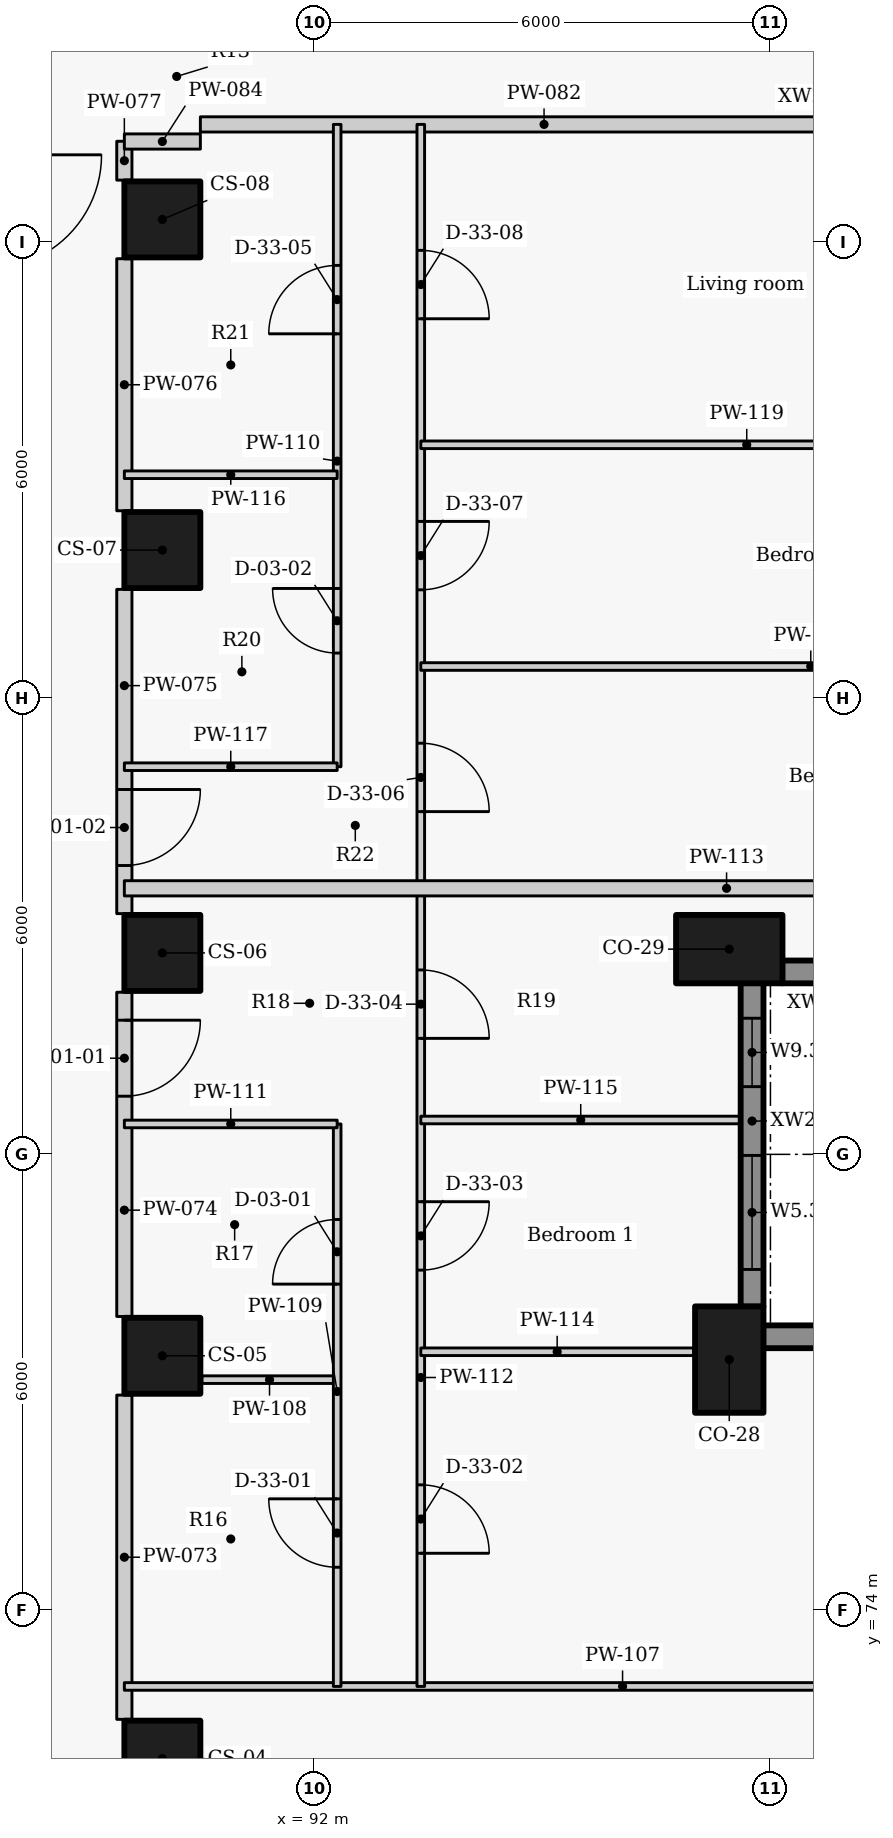
"""IFC4 building model, lengths in metres.
Left out: names, types, materials, properties, quantities, classifications, styles, units other than length and angle.
Written with IfcOpenShell. Run it as: python <this file> out.ifc"""

import sys

from ifc_helpers import new_model, si_unit, direction, frame, frame_2d, origin, origin_2d, place, context, subcontext, project, spatial, rectangle, extrude, element, fill, save


model = new_model("IFC4")
c1 = context("Model", 3, precision=1e-05, world=origin(), true_north=direction((0.0, 1.0)))
c2 = subcontext(c1, "Body", "Model", "MODEL_VIEW")
j1 = project(units=[si_unit("LENGTHUNIT", "METRE"), si_unit("PLANEANGLEUNIT", "RADIAN")], contexts=[c1])
p1 = place(None, origin())
s1 = spatial("IfcSite", under=j1, at=p1, CompositionType="ELEMENT")
p2 = place(p1, origin())
s2 = spatial("IfcBuilding", under=s1, at=p2, CompositionType="ELEMENT")
p3 = place(p2, frame((0.0, 0.0, 81.0)))
s3 = spatial("IfcBuildingStorey", under=s2, at=p3, CompositionType="ELEMENT", Elevation=81.0)
for number, where, z_axis, x_axis in (
    (1, (97.458, 77.3, 0.0), (0.0, 0.0, 1.0), (0.0, 1.0, 0.0)),
    (2, (97.458, 82.7, 0.0), (0.0, 0.0, 1.0), (1.0, 0.0, 0.0)),
):
    element("IfcColumn", number, at=place(p3, frame(where, z_axis=z_axis, x_axis=x_axis)), inside=s3, PredefinedType="COLUMN", context=c2, shape_type="SweptSolid", body=[
        extrude(rectangle(XDim=1.4, YDim=0.9, at=origin_2d()), origin(), (0.0, 0.0, 1.0), 3.3),
    ])
for number, where, z_axis, x_axis in (
    (3, (90.0, 72.05, 0.0), (0.0, 0.0, 1.0), (0.0, 1.0, 0.0)),
    (4, (90.0, 77.35, 0.0), (0.0, 0.0, 1.0), (0.0, 1.0, 0.0)),
    (5, (90.0, 82.65, 0.0), (0.0, 0.0, 1.0), (0.0, 1.0, 0.0)),
    (6, (90.0, 87.95, 0.0), (0.0, 0.0, 1.0), (0.0, 1.0, 0.0)),
    (7, (90.0, 92.3, 0.0), (0.0, 0.0, 1.0), (0.0, 1.0, 0.0)),
):
    element("IfcColumn", number, at=place(p3, frame(where, z_axis=z_axis, x_axis=x_axis)), inside=s3, PredefinedType="COLUMN", context=c2, shape_type="SweptSolid", body=[
        extrude(rectangle(XDim=1.0, YDim=1.0, at=origin_2d()), origin(), (0.0, 0.0, 1.0), 3.3),
    ])
p4 = place(p3, frame((98.154, 82.4, 0.0), z_axis=(0.0, 0.0, 1.0), x_axis=(1.0, 0.0, 0.0)))
e8 = element("IfcWall", 8, at=p4, inside=s3, PredefinedType="SOLIDWALL", context=c2, shape_type="SweptSolid", body=[
    extrude(rectangle(XDim=3.973, YDim=0.3, at=frame_2d((1.986, 0.0))), origin(), (0.0, 0.0, 1.0), 2.425),
])
p5 = place(p4, frame((1.236, 0.0, 0.9)))
e9 = element("IfcOpeningElement", 9, at=p5, cuts=e8, PredefinedType="OPENING", context=c2, shape_type="SweptSolid", body=[
    extrude(rectangle(XDim=1.5, YDim=1.1, at=frame_2d((0.75, 0.55))), frame((0.0, 0.16, 0.0), z_axis=(0.0, -1.0, 0.0), x_axis=(1.0, 0.0, 0.0)), (0.0, 0.0, 1.0), 0.32),
])
p6 = place(p3, frame((100.22, 92.677, 0.0), z_axis=(0.0, 0.0, 1.0), x_axis=(-0.499957037901, 0.866050206543, 0.0)))
e10 = element("IfcWall", 10, at=p6, inside=s3, PredefinedType="SOLIDWALL", context=c2, shape_type="SweptSolid", body=[
    extrude(rectangle(XDim=3.934, YDim=0.3, at=frame_2d((1.967, 0.0))), origin(), (0.0, 0.0, 1.0), 2.425),
])
p7 = place(p6, frame((2.945, 0.0, 0.9)))
e11 = element("IfcOpeningElement", 11, at=p7, cuts=e10, PredefinedType="OPENING", context=c2, shape_type="SweptSolid", body=[
    extrude(rectangle(XDim=0.6, YDim=1.1, at=frame_2d((0.3, 0.55))), frame((0.0, 0.16, 0.0), z_axis=(0.0, -1.0, 0.0), x_axis=(1.0, 0.0, 0.0)), (0.0, 0.0, 1.0), 0.32),
])
p8 = place(p3, frame((102.127, 77.6, 0.0), z_axis=(0.0, 0.0, 1.0), x_axis=(-1.0, 0.0, 0.0)))
e12 = element("IfcWall", 12, at=p8, inside=s3, PredefinedType="SOLIDWALL", context=c2, shape_type="SweptSolid", body=[
    extrude(rectangle(XDim=4.223, YDim=0.3, at=frame_2d((2.111, 0.0))), origin(), (0.0, 0.0, 1.0), 2.425),
])
p9 = place(p8, frame((1.061, 0.0, 0.9)))
e13 = element("IfcOpeningElement", 13, at=p9, cuts=e12, PredefinedType="OPENING", context=c2, shape_type="SweptSolid", body=[
    extrude(rectangle(XDim=2.1, YDim=1.1, at=frame_2d((1.05, 0.55))), frame((0.0, 0.16, 0.0), z_axis=(0.0, -1.0, 0.0), x_axis=(1.0, 0.0, 0.0)), (0.0, 0.0, 1.0), 0.32),
])
p10 = place(p3, frame((97.758, 77.996, 0.0), z_axis=(0.0, 0.0, 1.0), x_axis=(0.0, 1.0, 0.0)))
e14 = element("IfcWall", 14, at=p10, inside=s3, PredefinedType="SOLIDWALL", context=c2, shape_type="SweptSolid", body=[
    extrude(rectangle(XDim=4.258, YDim=0.3, at=frame_2d((2.129, 0.0))), origin(), (0.0, 0.0, 1.0), 2.425),
])
p11 = place(p10, frame((0.49, 0.0, 0.9)))
e15 = element("IfcOpeningElement", 15, at=p11, cuts=e14, PredefinedType="OPENING", context=c2, shape_type="SweptSolid", body=[
    extrude(rectangle(XDim=1.5, YDim=1.1, at=frame_2d((0.75, 0.55))), frame((0.0, 0.16, 0.0), z_axis=(0.0, -1.0, 0.0), x_axis=(1.0, 0.0, 0.0)), (0.0, 0.0, 1.0), 0.32),
])
p12 = place(p10, frame((2.895, 0.0, 0.9)))
e16 = element("IfcOpeningElement", 16, at=p12, cuts=e14, PredefinedType="OPENING", context=c2, shape_type="SweptSolid", body=[
    extrude(rectangle(XDim=0.9, YDim=1.1, at=frame_2d((0.45, 0.55))), frame((0.0, 0.16, 0.0), z_axis=(0.0, -1.0, 0.0), x_axis=(1.0, 0.0, 0.0)), (0.0, 0.0, 1.0), 0.32),
])
p13 = place(p3, frame((89.5, 72.567, 0.0), z_axis=(0.0, 0.0, 1.0), x_axis=(0.0, 1.0, 0.0)))
e17 = element("IfcWall", 17, at=p13, inside=s3, PredefinedType="PARTITIONING", context=c2, shape_type="SweptSolid", body=[
    extrude(rectangle(XDim=4.266, YDim=0.2, at=frame_2d((2.133, 0.0))), origin(), (0.0, 0.0, 1.0), 3.025),
])
p14 = place(p3, frame((89.5, 82.133, 0.0), z_axis=(0.0, 0.0, 1.0), x_axis=(0.0, -1.0, 0.0)))
e18 = element("IfcWall", 18, at=p14, inside=s3, PredefinedType="PARTITIONING", context=c2, shape_type="SweptSolid", body=[
    extrude(rectangle(XDim=4.266, YDim=0.2, at=frame_2d((2.133, 0.0))), origin(), (0.0, 0.0, 1.0), 3.025),
])
p15 = place(p14, frame((0.368, 0.0, 0.0)))
e19 = element("IfcOpeningElement", 19, at=p15, cuts=e18, PredefinedType="OPENING", context=c2, shape_type="SweptSolid", body=[
    extrude(rectangle(XDim=1.0, YDim=2.1, at=frame_2d((0.5, 1.05))), frame((0.0, 0.11, 0.0), z_axis=(0.0, -1.0, 0.0), x_axis=(1.0, 0.0, 0.0)), (0.0, 0.0, 1.0), 0.22),
])
p16 = place(p3, frame((89.5, 87.433, 0.0), z_axis=(0.0, 0.0, 1.0), x_axis=(0.0, -1.0, 0.0)))
e20 = element("IfcWall", 20, at=p16, inside=s3, PredefinedType="PARTITIONING", context=c2, shape_type="SweptSolid", body=[
    extrude(rectangle(XDim=4.266, YDim=0.2, at=frame_2d((2.133, 0.0))), origin(), (0.0, 0.0, 1.0), 3.025),
])
p17 = place(p16, frame((2.633, 0.0, 0.0)))
e21 = element("IfcOpeningElement", 21, at=p17, cuts=e20, PredefinedType="OPENING", context=c2, shape_type="SweptSolid", body=[
    extrude(rectangle(XDim=1.0, YDim=2.1, at=frame_2d((0.5, 1.05))), frame((0.0, 0.11, 0.0), z_axis=(0.0, -1.0, 0.0), x_axis=(1.0, 0.0, 0.0)), (0.0, 0.0, 1.0), 0.22),
])
p18 = place(p3, frame((89.5, 88.467, 0.0), z_axis=(0.0, 0.0, 1.0), x_axis=(0.0, 1.0, 0.0)))
e22 = element("IfcWall", 22, at=p18, inside=s3, PredefinedType="PARTITIONING", context=c2, shape_type="SweptSolid", body=[
    extrude(rectangle(XDim=3.316, YDim=0.2, at=frame_2d((1.658, 0.0))), origin(), (0.0, 0.0, 1.0), 3.025),
])
p19 = place(p3, frame((89.5, 92.817, 0.0), z_axis=(0.0, 0.0, 1.0), x_axis=(0.0, 1.0, 0.0)))
e23 = element("IfcWall", 23, at=p19, inside=s3, PredefinedType="PARTITIONING", context=c2, shape_type="SweptSolid", body=[
    extrude(rectangle(XDim=0.511, YDim=0.2, at=frame_2d((0.255, 0.0))), origin(), (0.0, 0.0, 1.0), 3.025),
])
p20 = place(p3, frame((90.5, 93.55, 0.0), z_axis=(0.0, 0.0, 1.0), x_axis=(1.0, 0.0, 0.0)))
e24 = element("IfcWall", 24, at=p20, inside=s3, PredefinedType="PARTITIONING", context=c2, shape_type="SweptSolid", body=[
    extrude(rectangle(XDim=9.043, YDim=0.2, at=frame_2d((4.521, 0.0))), origin(), (0.0, 0.0, 1.0), 2.405),
])
p21 = place(p3, frame((89.5, 93.325, 0.0), z_axis=(0.0, 0.0, 1.0), x_axis=(1.0, 0.0, 0.0)))
e25 = element("IfcWall", 25, at=p21, inside=s3, PredefinedType="PARTITIONING", context=c2, shape_type="SweptSolid", body=[
    extrude(rectangle(XDim=1.0, YDim=0.2, at=frame_2d((0.5, 0.0))), origin(), (0.0, 0.0, 1.0), 2.505),
])
p22 = place(p3, frame((89.5, 73.0, 0.0), z_axis=(0.0, 0.0, 1.0), x_axis=(1.0, 0.0, 0.0)))
e26 = element("IfcWall", 26, at=p22, inside=s3, PredefinedType="PARTITIONING", context=c2, shape_type="SweptSolid", body=[
    extrude(rectangle(XDim=13.109, YDim=0.1, at=frame_2d((6.555, 0.0))), origin(), (0.0, 0.0, 1.0), 2.505),
])
p23 = place(p3, frame((90.52, 77.036, 0.0), z_axis=(0.0, 0.0, 1.0), x_axis=(1.0, 0.0, 0.0)))
e27 = element("IfcWall", 27, at=p23, inside=s3, PredefinedType="PARTITIONING", context=c2, shape_type="SweptSolid", body=[
    extrude(rectangle(XDim=1.78, YDim=0.1, at=frame_2d((0.89, 0.0))), origin(), (0.0, 0.0, 1.0), 3.025),
])
p24 = place(p3, frame((92.3, 73.0, 0.0), z_axis=(0.0, 0.0, 1.0), x_axis=(0.0, 1.0, 0.0)))
e28 = element("IfcWall", 28, at=p24, inside=s3, PredefinedType="PARTITIONING", context=c2, shape_type="SweptSolid", body=[
    extrude(rectangle(XDim=7.4, YDim=0.1, at=frame_2d((3.7, 0.0))), origin(), (0.0, 0.0, 1.0), 3.025),
])
p25 = place(p24, frame((1.568, 0.0, 0.0)))
e29 = element("IfcOpeningElement", 29, at=p25, cuts=e28, PredefinedType="OPENING", context=c2, shape_type="SweptSolid", body=[
    extrude(rectangle(XDim=0.9, YDim=2.1, at=frame_2d((0.45, 1.05))), frame((0.0, 0.06, 0.0), z_axis=(0.0, -1.0, 0.0), x_axis=(1.0, 0.0, 0.0)), (0.0, 0.0, 1.0), 0.12),
])
p26 = place(p24, frame((5.293, 0.0, 0.0)))
e30 = element("IfcOpeningElement", 30, at=p26, cuts=e28, PredefinedType="OPENING", context=c2, shape_type="SweptSolid", body=[
    extrude(rectangle(XDim=0.85, YDim=2.1, at=frame_2d((0.425, 1.05))), frame((0.0, 0.06, 0.0), z_axis=(0.0, -1.0, 0.0), x_axis=(1.0, 0.0, 0.0)), (0.0, 0.0, 1.0), 0.12),
])
p27 = place(p3, frame((92.3, 85.1, 0.0), z_axis=(0.0, 0.0, 1.0), x_axis=(0.0, 1.0, 0.0)))
e31 = element("IfcWall", 31, at=p27, inside=s3, PredefinedType="PARTITIONING", context=c2, shape_type="SweptSolid", body=[
    extrude(rectangle(XDim=8.45, YDim=0.1, at=frame_2d((4.225, 0.0))), origin(), (0.0, 0.0, 1.0), 3.025),
])
p28 = place(p27, frame((1.495, 0.0, 0.0)))
e32 = element("IfcOpeningElement", 32, at=p28, cuts=e31, PredefinedType="OPENING", context=c2, shape_type="SweptSolid", body=[
    extrude(rectangle(XDim=0.85, YDim=2.1, at=frame_2d((0.425, 1.05))), frame((0.0, 0.06, 0.0), z_axis=(0.0, -1.0, 0.0), x_axis=(1.0, 0.0, 0.0)), (0.0, 0.0, 1.0), 0.12),
])
p29 = place(p27, frame((5.695, 0.0, 0.0)))
e33 = element("IfcOpeningElement", 33, at=p29, cuts=e31, PredefinedType="OPENING", context=c2, shape_type="SweptSolid", body=[
    extrude(rectangle(XDim=0.9, YDim=2.1, at=frame_2d((0.45, 1.05))), frame((0.0, 0.06, 0.0), z_axis=(0.0, -1.0, 0.0), x_axis=(1.0, 0.0, 0.0)), (0.0, 0.0, 1.0), 0.12),
])
p30 = place(p3, frame((89.5, 80.4, 0.0), z_axis=(0.0, 0.0, 1.0), x_axis=(1.0, 0.0, 0.0)))
e34 = element("IfcWall", 34, at=p30, inside=s3, PredefinedType="PARTITIONING", context=c2, shape_type="SweptSolid", body=[
    extrude(rectangle(XDim=2.8, YDim=0.1, at=frame_2d((1.4, 0.0))), origin(), (0.0, 0.0, 1.0), 2.505),
])
p31 = place(p3, frame((93.4, 93.55, 0.0), z_axis=(0.0, 0.0, 1.0), x_axis=(0.0, -1.0, 0.0)))
e35 = element("IfcWall", 35, at=p31, inside=s3, PredefinedType="PARTITIONING", context=c2, shape_type="SweptSolid", body=[
    extrude(rectangle(XDim=20.55, YDim=0.1, at=frame_2d((10.275, 0.0))), origin(), (0.0, 0.0, 1.0), 3.025),
])
p32 = place(p31, frame((17.898, 0.0, 0.0)))
e36 = element("IfcOpeningElement", 36, at=p32, cuts=e35, PredefinedType="OPENING", context=c2, shape_type="SweptSolid", body=[
    extrude(rectangle(XDim=0.9, YDim=2.1, at=frame_2d((0.45, 1.05))), frame((0.0, 0.06, 0.0), z_axis=(0.0, -1.0, 0.0), x_axis=(1.0, 0.0, 0.0)), (0.0, 0.0, 1.0), 0.12),
])
p33 = place(p31, frame((14.173, 0.0, 0.0)))
e37 = element("IfcOpeningElement", 37, at=p33, cuts=e35, PredefinedType="OPENING", context=c2, shape_type="SweptSolid", body=[
    extrude(rectangle(XDim=0.9, YDim=2.1, at=frame_2d((0.45, 1.05))), frame((0.0, 0.06, 0.0), z_axis=(0.0, -1.0, 0.0), x_axis=(1.0, 0.0, 0.0)), (0.0, 0.0, 1.0), 0.12),
])
p34 = place(p31, frame((11.124, 0.0, 0.0)))
e38 = element("IfcOpeningElement", 38, at=p34, cuts=e35, PredefinedType="OPENING", context=c2, shape_type="SweptSolid", body=[
    extrude(rectangle(XDim=0.9, YDim=2.1, at=frame_2d((0.45, 1.05))), frame((0.0, 0.06, 0.0), z_axis=(0.0, -1.0, 0.0), x_axis=(1.0, 0.0, 0.0)), (0.0, 0.0, 1.0), 0.12),
])
p35 = place(p31, frame((8.141, 0.0, 0.0)))
e39 = element("IfcOpeningElement", 39, at=p35, cuts=e35, PredefinedType="OPENING", context=c2, shape_type="SweptSolid", body=[
    extrude(rectangle(XDim=0.9, YDim=2.1, at=frame_2d((0.45, 1.05))), frame((0.0, 0.06, 0.0), z_axis=(0.0, -1.0, 0.0), x_axis=(1.0, 0.0, 0.0)), (0.0, 0.0, 1.0), 0.12),
])
p36 = place(p31, frame((5.223, 0.0, 0.0)))
e40 = element("IfcOpeningElement", 40, at=p36, cuts=e35, PredefinedType="OPENING", context=c2, shape_type="SweptSolid", body=[
    extrude(rectangle(XDim=0.9, YDim=2.1, at=frame_2d((0.45, 1.05))), frame((0.0, 0.06, 0.0), z_axis=(0.0, -1.0, 0.0), x_axis=(1.0, 0.0, 0.0)), (0.0, 0.0, 1.0), 0.12),
])
p37 = place(p31, frame((1.657, 0.0, 0.0)))
e41 = element("IfcOpeningElement", 41, at=p37, cuts=e35, PredefinedType="OPENING", context=c2, shape_type="SweptSolid", body=[
    extrude(rectangle(XDim=0.9, YDim=2.1, at=frame_2d((0.45, 1.05))), frame((0.0, 0.06, 0.0), z_axis=(0.0, -1.0, 0.0), x_axis=(1.0, 0.0, 0.0)), (0.0, 0.0, 1.0), 0.12),
])
p38 = place(p3, frame((89.5, 83.5, 0.0), z_axis=(0.0, 0.0, 1.0), x_axis=(1.0, 0.0, 0.0)))
e42 = element("IfcWall", 42, at=p38, inside=s3, PredefinedType="PARTITIONING", context=c2, shape_type="SweptSolid", body=[
    extrude(rectangle(XDim=15.846, YDim=0.2, at=frame_2d((7.923, 0.0))), origin(), (0.0, 0.0, 1.0), 2.405),
])
p39 = place(p3, frame((93.4, 77.403, 0.0), z_axis=(0.0, 0.0, 1.0), x_axis=(1.0, 0.0, 0.0)))
e43 = element("IfcWall", 43, at=p39, inside=s3, PredefinedType="PARTITIONING", context=c2, shape_type="SweptSolid", body=[
    extrude(rectangle(XDim=3.588, YDim=0.1, at=frame_2d((1.794, 0.0))), origin(), (0.0, 0.0, 1.0), 3.025),
])
p40 = place(p3, frame((93.4, 80.452, 0.0), z_axis=(0.0, 0.0, 1.0), x_axis=(1.0, 0.0, 0.0)))
e44 = element("IfcWall", 44, at=p40, inside=s3, PredefinedType="PARTITIONING", context=c2, shape_type="SweptSolid", body=[
    extrude(rectangle(XDim=4.208, YDim=0.1, at=frame_2d((2.104, 0.0))), origin(), (0.0, 0.0, 1.0), 2.405),
])
for number, where, z_axis, x_axis in (
    (45, (89.5, 88.941, 0.0), (0.0, 0.0, 1.0), (1.0, 0.0, 0.0)),
    (46, (89.5, 85.1, 0.0), (0.0, 0.0, 1.0), (1.0, 0.0, 0.0)),
):
    element("IfcWall", number, at=place(p3, frame(where, z_axis=z_axis, x_axis=x_axis)), inside=s3, PredefinedType="PARTITIONING", context=c2, shape_type="SweptSolid", body=[
        extrude(rectangle(XDim=2.8, YDim=0.1, at=frame_2d((1.4, 0.0))), origin(), (0.0, 0.0, 1.0), 2.505),
    ])
p41 = place(p3, frame((93.4, 86.418, 0.0), z_axis=(0.0, 0.0, 1.0), x_axis=(1.0, 0.0, 0.0)))
e47 = element("IfcWall", 47, at=p41, inside=s3, PredefinedType="PARTITIONING", context=c2, shape_type="SweptSolid", body=[
    extrude(rectangle(XDim=10.261, YDim=0.1, at=frame_2d((5.131, 0.0))), origin(), (0.0, 0.0, 1.0), 2.405),
])
p42 = place(p3, frame((93.4, 89.335, 0.0), z_axis=(0.0, 0.0, 1.0), x_axis=(1.0, 0.0, 0.0)))
e48 = element("IfcWall", 48, at=p42, inside=s3, PredefinedType="PARTITIONING", context=c2, shape_type="SweptSolid", body=[
    extrude(rectangle(XDim=8.577, YDim=0.1, at=frame_2d((4.288, 0.0))), origin(), (0.0, 0.0, 1.0), 2.405),
])
p43 = place(p11, origin())
e49 = element("IfcWindow", 49, at=p43, inside=s3, PartitioningType="SINGLE_PANEL", PredefinedType="WINDOW", context=c2, shape_type="SweptSolid", body=[
    extrude(rectangle(XDim=1.5, YDim=1.1, at=frame_2d((0.75, 0.55))), frame((0.0, 0.03, 0.0), z_axis=(0.0, -1.0, 0.0), x_axis=(1.0, 0.0, 0.0)), (0.0, 0.0, 1.0), 0.06),
])
fill(e15, e49)
p44 = place(p12, origin())
e50 = element("IfcWindow", 50, at=p44, inside=s3, PartitioningType="SINGLE_PANEL", PredefinedType="WINDOW", context=c2, shape_type="SweptSolid", body=[
    extrude(rectangle(XDim=0.9, YDim=1.1, at=frame_2d((0.45, 0.55))), frame((0.0, 0.03, 0.0), z_axis=(0.0, -1.0, 0.0), x_axis=(1.0, 0.0, 0.0)), (0.0, 0.0, 1.0), 0.06),
])
fill(e16, e50)
p45 = place(p15, origin())
e51 = element("IfcDoor", 51, at=p45, inside=s3, OperationType="SINGLE_SWING_LEFT", PredefinedType="DOOR", context=c2, shape_type="SweptSolid", body=[
    extrude(rectangle(XDim=1.0, YDim=2.1, at=frame_2d((0.5, 1.05))), frame((0.0, 0.025, 0.0), z_axis=(0.0, -1.0, 0.0), x_axis=(1.0, 0.0, 0.0)), (0.0, 0.0, 1.0), 0.05),
])
fill(e19, e51)
p46 = place(p25, origin())
e52 = element("IfcDoor", 52, at=p46, inside=s3, OperationType="SINGLE_SWING_RIGHT", PredefinedType="DOOR", context=c2, shape_type="SweptSolid", body=[
    extrude(rectangle(XDim=0.9, YDim=2.1, at=frame_2d((0.45, 1.05))), frame((0.0, 0.025, 0.0), z_axis=(0.0, -1.0, 0.0), x_axis=(1.0, 0.0, 0.0)), (0.0, 0.0, 1.0), 0.05),
])
fill(e29, e52)
p47 = place(p26, origin())
e53 = element("IfcDoor", 53, at=p47, inside=s3, OperationType="SINGLE_SWING_LEFT", PredefinedType="DOOR", context=c2, shape_type="SweptSolid", body=[
    extrude(rectangle(XDim=0.85, YDim=2.1, at=frame_2d((0.425, 1.05))), frame((0.0, 0.025, 0.0), z_axis=(0.0, -1.0, 0.0), x_axis=(1.0, 0.0, 0.0)), (0.0, 0.0, 1.0), 0.05),
])
fill(e30, e53)
p48 = place(p32, origin())
e54 = element("IfcDoor", 54, at=p48, inside=s3, OperationType="SINGLE_SWING_RIGHT", PredefinedType="DOOR", context=c2, shape_type="SweptSolid", body=[
    extrude(rectangle(XDim=0.9, YDim=2.1, at=frame_2d((0.45, 1.05))), frame((0.0, 0.025, 0.0), z_axis=(0.0, -1.0, 0.0), x_axis=(1.0, 0.0, 0.0)), (0.0, 0.0, 1.0), 0.05),
])
fill(e36, e54)
p49 = place(p33, origin())
e55 = element("IfcDoor", 55, at=p49, inside=s3, OperationType="SINGLE_SWING_LEFT", PredefinedType="DOOR", context=c2, shape_type="SweptSolid", body=[
    extrude(rectangle(XDim=0.9, YDim=2.1, at=frame_2d((0.45, 1.05))), frame((0.0, 0.025, 0.0), z_axis=(0.0, -1.0, 0.0), x_axis=(1.0, 0.0, 0.0)), (0.0, 0.0, 1.0), 0.05),
])
fill(e37, e55)
p50 = place(p34, origin())
e56 = element("IfcDoor", 56, at=p50, inside=s3, OperationType="SINGLE_SWING_RIGHT", PredefinedType="DOOR", context=c2, shape_type="SweptSolid", body=[
    extrude(rectangle(XDim=0.9, YDim=2.1, at=frame_2d((0.45, 1.05))), frame((0.0, 0.025, 0.0), z_axis=(0.0, -1.0, 0.0), x_axis=(1.0, 0.0, 0.0)), (0.0, 0.0, 1.0), 0.05),
])
fill(e38, e56)
p51 = place(p17, origin())
e57 = element("IfcDoor", 57, at=p51, inside=s3, OperationType="SINGLE_SWING_LEFT", PredefinedType="DOOR", context=c2, shape_type="SweptSolid", body=[
    extrude(rectangle(XDim=1.0, YDim=2.1, at=frame_2d((0.5, 1.05))), frame((0.0, 0.025, 0.0), z_axis=(0.0, -1.0, 0.0), x_axis=(1.0, 0.0, 0.0)), (0.0, 0.0, 1.0), 0.05),
])
fill(e21, e57)
p52 = place(p28, origin())
e58 = element("IfcDoor", 58, at=p52, inside=s3, OperationType="SINGLE_SWING_RIGHT", PredefinedType="DOOR", context=c2, shape_type="SweptSolid", body=[
    extrude(rectangle(XDim=0.85, YDim=2.1, at=frame_2d((0.425, 1.05))), frame((0.0, 0.025, 0.0), z_axis=(0.0, -1.0, 0.0), x_axis=(1.0, 0.0, 0.0)), (0.0, 0.0, 1.0), 0.05),
])
fill(e32, e58)
p53 = place(p29, origin())
e59 = element("IfcDoor", 59, at=p53, inside=s3, OperationType="SINGLE_SWING_LEFT", PredefinedType="DOOR", context=c2, shape_type="SweptSolid", body=[
    extrude(rectangle(XDim=0.9, YDim=2.1, at=frame_2d((0.45, 1.05))), frame((0.0, 0.025, 0.0), z_axis=(0.0, -1.0, 0.0), x_axis=(1.0, 0.0, 0.0)), (0.0, 0.0, 1.0), 0.05),
])
fill(e33, e59)
p54 = place(p35, origin())
e60 = element("IfcDoor", 60, at=p54, inside=s3, OperationType="SINGLE_SWING_RIGHT", PredefinedType="DOOR", context=c2, shape_type="SweptSolid", body=[
    extrude(rectangle(XDim=0.9, YDim=2.1, at=frame_2d((0.45, 1.05))), frame((0.0, 0.025, 0.0), z_axis=(0.0, -1.0, 0.0), x_axis=(1.0, 0.0, 0.0)), (0.0, 0.0, 1.0), 0.05),
])
fill(e39, e60)
p55 = place(p36, origin())
e61 = element("IfcDoor", 61, at=p55, inside=s3, OperationType="SINGLE_SWING_LEFT", PredefinedType="DOOR", context=c2, shape_type="SweptSolid", body=[
    extrude(rectangle(XDim=0.9, YDim=2.1, at=frame_2d((0.45, 1.05))), frame((0.0, 0.025, 0.0), z_axis=(0.0, -1.0, 0.0), x_axis=(1.0, 0.0, 0.0)), (0.0, 0.0, 1.0), 0.05),
])
fill(e40, e61)
p56 = place(p37, origin())
e62 = element("IfcDoor", 62, at=p56, inside=s3, OperationType="SINGLE_SWING_RIGHT", PredefinedType="DOOR", context=c2, shape_type="SweptSolid", body=[
    extrude(rectangle(XDim=0.9, YDim=2.1, at=frame_2d((0.45, 1.05))), frame((0.0, 0.025, 0.0), z_axis=(0.0, -1.0, 0.0), x_axis=(1.0, 0.0, 0.0)), (0.0, 0.0, 1.0), 0.05),
])
fill(e41, e62)
save(model, sys.argv[1])
